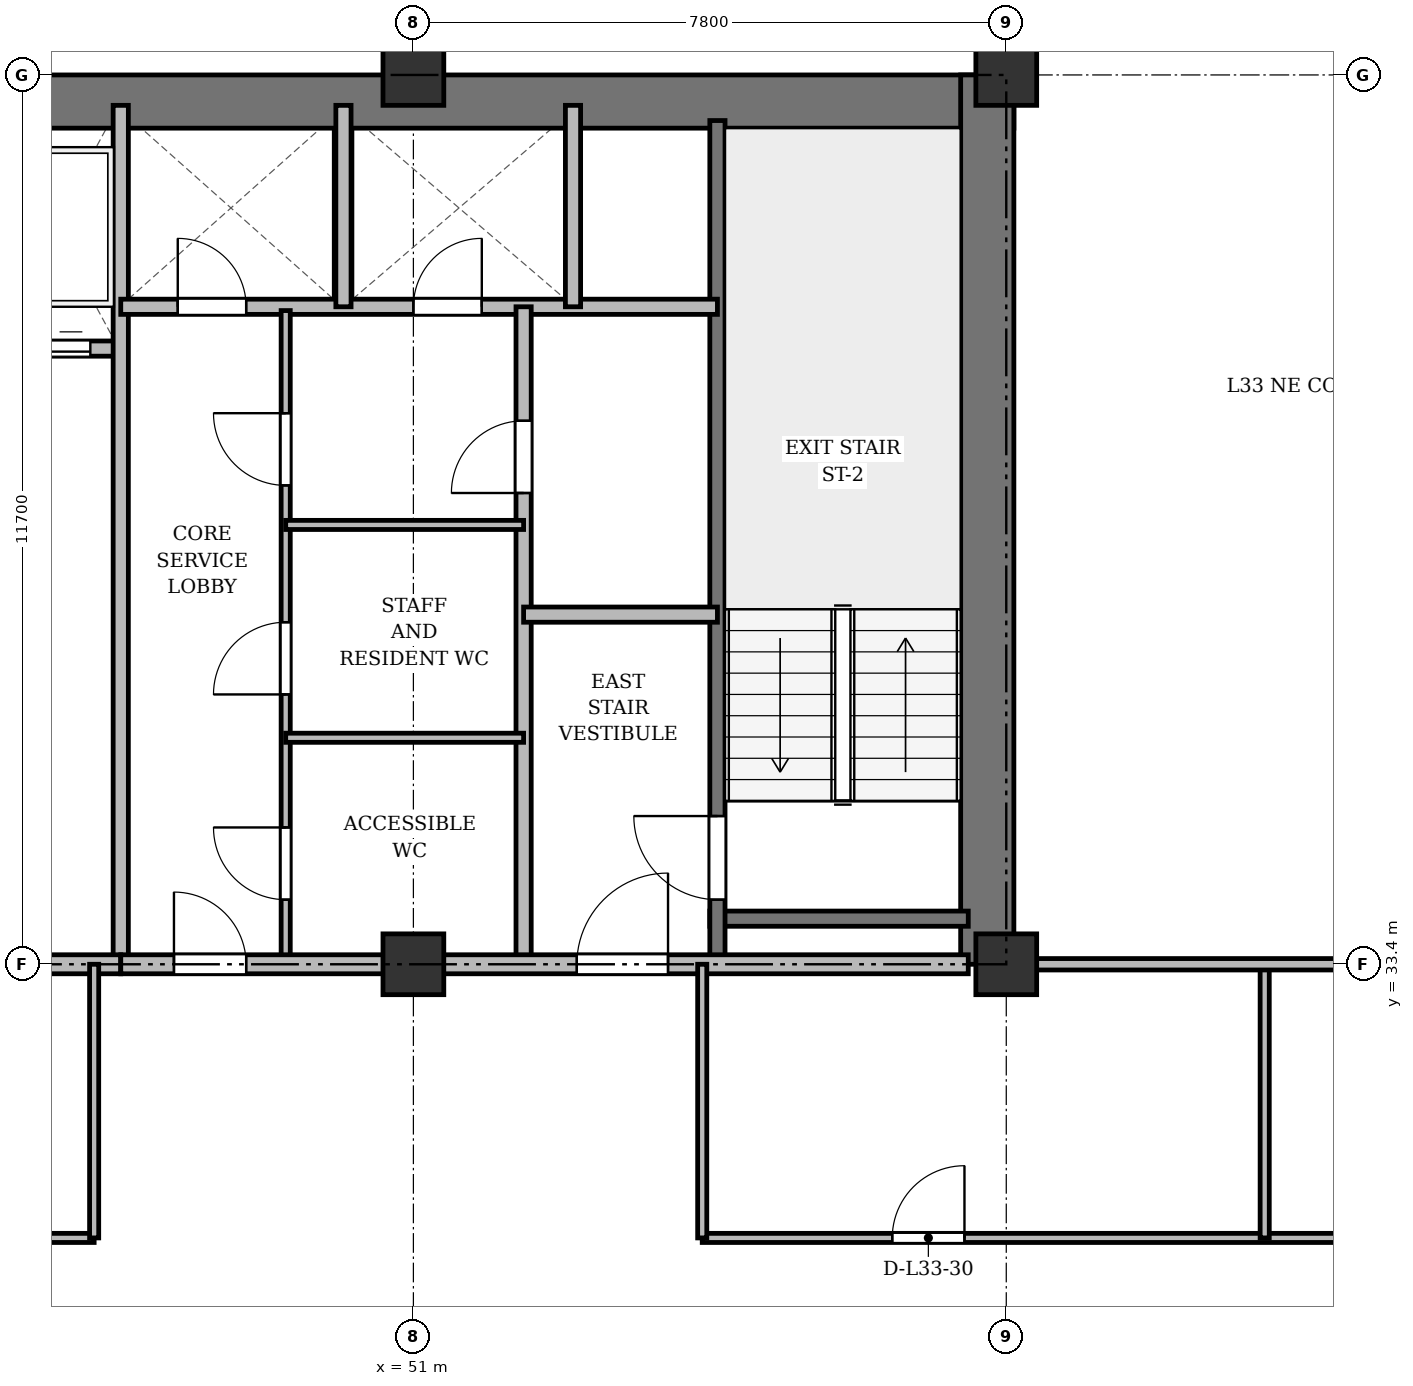
"""IFC4 building model, lengths in metres.
Left out: names, types, materials, properties, quantities, classifications, styles, units other than length and angle.
Written with IfcOpenShell. Run it as: python <this file> out.ifc"""

import sys

from ifc_helpers import new_model, si_unit, direction, frame, frame_2d, origin, origin_2d, place, context, subcontext, project, spatial, rectangle, extrude, source, transform, mapped, element, fill, save


model = new_model("IFC4")
c1 = context("Model", 3, precision=1e-05, world=origin(), true_north=direction((0.0, 1.0)))
c2 = subcontext(c1, "Body", "Model", "MODEL_VIEW")
j1 = project(units=[si_unit("LENGTHUNIT", "METRE"), si_unit("PLANEANGLEUNIT", "RADIAN")], contexts=[c1])
p1 = place(None, origin())
s1 = spatial("IfcSite", under=j1, at=p1, CompositionType="ELEMENT")
p2 = place(p1, origin())
s2 = spatial("IfcBuilding", under=s1, at=p2, CompositionType="ELEMENT")
p3 = place(p2, frame((0.0, 0.0, 128.5)))
s3 = spatial("IfcBuildingStorey", under=s2, at=p3, CompositionType="ELEMENT", Elevation=128.5)
m1 = source(origin(), c2, "Body", "SweptSolid", [
    extrude(rectangle(XDim=0.8, YDim=0.8, at=origin_2d()), origin(), (0.0, 0.0, 1.0), 3.6),
])
for number, where, z_axis, x_axis in (
    (1, (51.0, 33.4, 0.0), (0.0, 0.0, 1.0), (1.0, 0.0, 0.0)),
    (2, (51.0, 45.1, 0.0), (0.0, 0.0, 1.0), (1.0, 0.0, 0.0)),
    (3, (58.8, 33.4, 0.0), (0.0, 0.0, 1.0), (1.0, 0.0, 0.0)),
    (4, (58.8, 45.1, 0.0), (0.0, 0.0, 1.0), (1.0, 0.0, 0.0)),
):
    element("IfcColumn", number, at=place(p3, frame(where, z_axis=z_axis, x_axis=x_axis)), inside=s3, PredefinedType="COLUMN", context=c2, shape_type="MappedRepresentation", body=[
        mapped(m1, transform((0.0, 0.0, 0.0), x_axis=(1.0, 0.0, 0.0), y_axis=(0.0, 1.0, 0.0), z_axis=(0.0, 0.0, 1.0), scale=1.0)),
    ])
p4 = place(p3, frame((15.5, 44.75, 0.0), z_axis=(0.0, 0.0, 1.0), x_axis=(1.0, 0.0, 0.0)))
e5 = element("IfcWall", 5, at=p4, inside=s3, PredefinedType="SHEAR", context=c2, shape_type="SweptSolid", body=[
    extrude(rectangle(XDim=43.4, YDim=0.7, at=frame_2d((21.7, 0.0))), origin(), (0.0, 0.0, 1.0), 3.22),
])
p5 = place(p3, frame((58.55, 33.4, 0.0), z_axis=(0.0, 0.0, 1.0), x_axis=(0.0, 1.0, 0.0)))
e6 = element("IfcWall", 6, at=p5, inside=s3, PredefinedType="SHEAR", context=c2, shape_type="SweptSolid", body=[
    extrude(rectangle(XDim=11.7, YDim=0.7, at=frame_2d((5.85, 0.0))), origin(), (0.0, 0.0, 1.0), 3.22),
])
p6 = place(p3, frame((54.9, 34.0, 0.0), z_axis=(0.0, 0.0, 1.0), x_axis=(1.0, 0.0, 0.0)))
e7 = element("IfcWall", 7, at=p6, inside=s3, PredefinedType="SHEAR", context=c2, shape_type="SweptSolid", body=[
    extrude(rectangle(XDim=3.4, YDim=0.2, at=frame_2d((1.7, 0.0))), origin(), (0.0, 0.0, 1.0), 3.22),
])
p7 = place(p3, frame((55.0, 33.4, 0.0), z_axis=(0.0, 0.0, 1.0), x_axis=(0.0, 1.0, 0.0)))
e8 = element("IfcWall", 8, at=p7, inside=s3, PredefinedType="SHEAR", context=c2, shape_type="SweptSolid", body=[
    extrude(rectangle(XDim=11.1, YDim=0.2, at=frame_2d((5.55, 0.0))), origin(), (0.0, 0.0, 1.0), 3.22),
])
p8 = place(p7, frame((0.85, 0.0, 0.0)))
e9 = element("IfcOpeningElement", 9, at=p8, cuts=e8, PredefinedType="OPENING", context=c2, shape_type="SweptSolid", body=[
    extrude(rectangle(XDim=1.1, YDim=2.15, at=frame_2d((0.55, 1.075))), frame((0.0, 0.11, 0.0), z_axis=(0.0, -1.0, 0.0), x_axis=(1.0, 0.0, 0.0)), (0.0, 0.0, 1.0), 0.22),
])
p9 = place(p3, frame((40.25, 41.5, 0.0), z_axis=(0.0, 0.0, 1.0), x_axis=(1.0, 0.0, 0.0)))
e10 = element("IfcWall", 10, at=p9, inside=s3, PredefinedType="SOLIDWALL", context=c2, shape_type="SweptSolid", body=[
    extrude(rectangle(XDim=6.9, YDim=0.2, at=frame_2d((3.45, 0.0))), origin(), (0.0, 0.0, 1.0), 2.72),
])
p10 = place(p9, frame((0.35, 0.0, 0.0)))
e11 = element("IfcOpeningElement", 11, at=p10, cuts=e10, PredefinedType="OPENING", context=c2, shape_type="SweptSolid", body=[
    extrude(rectangle(XDim=1.05, YDim=2.15, at=frame_2d((0.525, 1.075))), frame((0.0, 0.11, 0.0), z_axis=(0.0, -1.0, 0.0), x_axis=(1.0, 0.0, 0.0)), (0.0, 0.0, 1.0), 0.22),
])
p11 = place(p9, frame((2.05, 0.0, 0.0)))
e12 = element("IfcOpeningElement", 12, at=p11, cuts=e10, PredefinedType="OPENING", context=c2, shape_type="SweptSolid", body=[
    extrude(rectangle(XDim=1.05, YDim=2.15, at=frame_2d((0.525, 1.075))), frame((0.0, 0.11, 0.0), z_axis=(0.0, -1.0, 0.0), x_axis=(1.0, 0.0, 0.0)), (0.0, 0.0, 1.0), 0.22),
])
p12 = place(p9, frame((3.75, 0.0, 0.0)))
e13 = element("IfcOpeningElement", 13, at=p12, cuts=e10, PredefinedType="OPENING", context=c2, shape_type="SweptSolid", body=[
    extrude(rectangle(XDim=1.05, YDim=2.15, at=frame_2d((0.525, 1.075))), frame((0.0, 0.11, 0.0), z_axis=(0.0, -1.0, 0.0), x_axis=(1.0, 0.0, 0.0)), (0.0, 0.0, 1.0), 0.22),
])
p13 = place(p9, frame((5.45, 0.0, 0.0)))
e14 = element("IfcOpeningElement", 14, at=p13, cuts=e10, PredefinedType="OPENING", context=c2, shape_type="SweptSolid", body=[
    extrude(rectangle(XDim=1.05, YDim=2.15, at=frame_2d((0.525, 1.075))), frame((0.0, 0.11, 0.0), z_axis=(0.0, -1.0, 0.0), x_axis=(1.0, 0.0, 0.0)), (0.0, 0.0, 1.0), 0.22),
])
p14 = place(p3, frame((47.15, 33.4, 0.0), z_axis=(0.0, 0.0, 1.0), x_axis=(0.0, 1.0, 0.0)))
e15 = element("IfcWall", 15, at=p14, inside=s3, PredefinedType="SOLIDWALL", context=c2, shape_type="SweptSolid", body=[
    extrude(rectangle(XDim=11.3, YDim=0.2, at=frame_2d((5.65, 0.0))), origin(), (0.0, 0.0, 1.0), 2.632),
])
p15 = place(p3, frame((26.3, 33.4, 0.0), z_axis=(0.0, 0.0, 1.0), x_axis=(1.0, 0.0, 0.0)))
e16 = element("IfcWall", 16, at=p15, inside=s3, PredefinedType="PARTITIONING", context=c2, shape_type="SweptSolid", body=[
    extrude(rectangle(XDim=20.85, YDim=0.25, at=frame_2d((10.425, 0.0))), origin(), (0.0, 0.0, 1.0), 2.632),
])
p16 = place(p15, frame((9.2, 0.0, 0.0)))
e17 = element("IfcOpeningElement", 17, at=p16, cuts=e16, PredefinedType="OPENING", context=c2, shape_type="SweptSolid", body=[
    extrude(rectangle(XDim=1.6, YDim=2.2, at=frame_2d((0.8, 1.1))), frame((0.0, 0.135, 0.0), z_axis=(0.0, -1.0, 0.0), x_axis=(1.0, 0.0, 0.0)), (0.0, 0.0, 1.0), 0.27),
])
p17 = place(p3, frame((47.15, 42.05, 0.0), z_axis=(0.0, 0.0, 1.0), x_axis=(1.0, 0.0, 0.0)))
e18 = element("IfcWall", 18, at=p17, inside=s3, PredefinedType="SOLIDWALL", context=c2, shape_type="SweptSolid", body=[
    extrude(rectangle(XDim=7.85, YDim=0.2, at=frame_2d((3.925, 0.0))), origin(), (0.0, 0.0, 1.0), 2.72),
])
p18 = place(p17, frame((0.75, 0.0, 0.0)))
e19 = element("IfcOpeningElement", 19, at=p18, cuts=e18, PredefinedType="OPENING", context=c2, shape_type="SweptSolid", body=[
    extrude(rectangle(XDim=0.9, YDim=2.1, at=frame_2d((0.45, 1.05))), frame((0.0, 0.11, 0.0), z_axis=(0.0, -1.0, 0.0), x_axis=(1.0, 0.0, 0.0)), (0.0, 0.0, 1.0), 0.22),
])
p19 = place(p17, frame((3.85, 0.0, 0.0)))
e20 = element("IfcOpeningElement", 20, at=p19, cuts=e18, PredefinedType="OPENING", context=c2, shape_type="SweptSolid", body=[
    extrude(rectangle(XDim=0.9, YDim=2.1, at=frame_2d((0.45, 1.05))), frame((0.0, 0.11, 0.0), z_axis=(0.0, -1.0, 0.0), x_axis=(1.0, 0.0, 0.0)), (0.0, 0.0, 1.0), 0.22),
])
for number, where, z_axis, x_axis in (
    (21, (50.08, 42.05, 0.0), (0.0, 0.0, 1.0), (0.0, 1.0, 0.0)),
    (22, (53.1, 42.05, 0.0), (0.0, 0.0, 1.0), (0.0, 1.0, 0.0)),
):
    element("IfcWall", number, at=place(p3, frame(where, z_axis=z_axis, x_axis=x_axis)), inside=s3, PredefinedType="SOLIDWALL", context=c2, shape_type="SweptSolid", body=[
        extrude(rectangle(XDim=2.65, YDim=0.2, at=frame_2d((1.325, 0.0))), origin(), (0.0, 0.0, 1.0), 3.22),
    ])
p20 = place(p3, frame((52.45, 33.4, 0.0), z_axis=(0.0, 0.0, 1.0), x_axis=(0.0, 1.0, 0.0)))
e23 = element("IfcWall", 23, at=p20, inside=s3, PredefinedType="PARTITIONING", context=c2, shape_type="SweptSolid", body=[
    extrude(rectangle(XDim=8.65, YDim=0.2, at=frame_2d((4.325, 0.0))), origin(), (0.0, 0.0, 1.0), 2.632),
])
p21 = place(p20, frame((6.2, 0.0, 0.0)))
e24 = element("IfcOpeningElement", 24, at=p21, cuts=e23, PredefinedType="OPENING", context=c2, shape_type="SweptSolid", body=[
    extrude(rectangle(XDim=0.95, YDim=2.15, at=frame_2d((0.475, 1.075))), frame((0.0, 0.11, 0.0), z_axis=(0.0, -1.0, 0.0), x_axis=(1.0, 0.0, 0.0)), (0.0, 0.0, 1.0), 0.22),
])
p22 = place(p3, frame((52.45, 38.0, 0.0), z_axis=(0.0, 0.0, 1.0), x_axis=(1.0, 0.0, 0.0)))
e25 = element("IfcWall", 25, at=p22, inside=s3, PredefinedType="PARTITIONING", context=c2, shape_type="SweptSolid", body=[
    extrude(rectangle(XDim=2.55, YDim=0.2, at=frame_2d((1.275, 0.0))), origin(), (0.0, 0.0, 1.0), 3.22),
])
p23 = place(p3, frame((49.32, 33.4, 0.0), z_axis=(0.0, 0.0, 1.0), x_axis=(0.0, 1.0, 0.0)))
e26 = element("IfcWall", 26, at=p23, inside=s3, PredefinedType="PARTITIONING", context=c2, shape_type="SweptSolid", body=[
    extrude(rectangle(XDim=8.6, YDim=0.12, at=frame_2d((4.3, 0.0))), origin(), (0.0, 0.0, 1.0), 2.632),
])
p24 = place(p23, frame((0.85, 0.0, 0.0)))
e27 = element("IfcOpeningElement", 27, at=p24, cuts=e26, PredefinedType="OPENING", context=c2, shape_type="SweptSolid", body=[
    extrude(rectangle(XDim=0.95, YDim=2.15, at=frame_2d((0.475, 1.075))), frame((0.0, 0.07, 0.0), z_axis=(0.0, -1.0, 0.0), x_axis=(1.0, 0.0, 0.0)), (0.0, 0.0, 1.0), 0.14),
])
p25 = place(p23, frame((3.55, 0.0, 0.0)))
e28 = element("IfcOpeningElement", 28, at=p25, cuts=e26, PredefinedType="OPENING", context=c2, shape_type="SweptSolid", body=[
    extrude(rectangle(XDim=0.95, YDim=2.15, at=frame_2d((0.475, 1.075))), frame((0.0, 0.07, 0.0), z_axis=(0.0, -1.0, 0.0), x_axis=(1.0, 0.0, 0.0)), (0.0, 0.0, 1.0), 0.14),
])
p26 = place(p23, frame((6.3, 0.0, 0.0)))
e29 = element("IfcOpeningElement", 29, at=p26, cuts=e26, PredefinedType="OPENING", context=c2, shape_type="SweptSolid", body=[
    extrude(rectangle(XDim=0.95, YDim=2.15, at=frame_2d((0.475, 1.075))), frame((0.0, 0.07, 0.0), z_axis=(0.0, -1.0, 0.0), x_axis=(1.0, 0.0, 0.0)), (0.0, 0.0, 1.0), 0.14),
])
for number, where, z_axis, x_axis in (
    (30, (49.32, 36.38, 0.0), (0.0, 0.0, 1.0), (1.0, 0.0, 0.0)),
    (31, (49.32, 39.18, 0.0), (0.0, 0.0, 1.0), (1.0, 0.0, 0.0)),
):
    element("IfcWall", number, at=place(p3, frame(where, z_axis=z_axis, x_axis=x_axis)), inside=s3, PredefinedType="PARTITIONING", context=c2, shape_type="SweptSolid", body=[
        extrude(rectangle(XDim=3.13, YDim=0.12, at=frame_2d((1.565, 0.0))), origin(), (0.0, 0.0, 1.0), 2.72),
    ])
p27 = place(p3, frame((47.15, 33.4, 0.0), z_axis=(0.0, 0.0, 1.0), x_axis=(1.0, 0.0, 0.0)))
e32 = element("IfcWall", 32, at=p27, inside=s3, PredefinedType="PARTITIONING", context=c2, shape_type="SweptSolid", body=[
    extrude(rectangle(XDim=11.15, YDim=0.25, at=frame_2d((5.575, 0.0))), origin(), (0.0, 0.0, 1.0), 2.632),
])
p28 = place(p27, frame((0.7, 0.0, 0.0)))
e33 = element("IfcOpeningElement", 33, at=p28, cuts=e32, PredefinedType="OPENING", context=c2, shape_type="SweptSolid", body=[
    extrude(rectangle(XDim=0.95, YDim=2.15, at=frame_2d((0.475, 1.075))), frame((0.0, 0.135, 0.0), z_axis=(0.0, -1.0, 0.0), x_axis=(1.0, 0.0, 0.0)), (0.0, 0.0, 1.0), 0.27),
])
p29 = place(p27, frame((6.0, 0.0, 0.0)))
e34 = element("IfcOpeningElement", 34, at=p29, cuts=e32, PredefinedType="OPENING", context=c2, shape_type="SweptSolid", body=[
    extrude(rectangle(XDim=1.2, YDim=2.15, at=frame_2d((0.6, 1.075))), frame((0.0, 0.135, 0.0), z_axis=(0.0, -1.0, 0.0), x_axis=(1.0, 0.0, 0.0)), (0.0, 0.0, 1.0), 0.27),
])
p30 = place(p3, frame((38.2, 29.8, 0.0), z_axis=(0.0, 0.0, 1.0), x_axis=(1.0, 0.0, 0.0)))
e35 = element("IfcWall", 35, at=p30, inside=s3, PredefinedType="PARTITIONING", context=c2, shape_type="SweptSolid", body=[
    extrude(rectangle(XDim=8.6, YDim=0.12, at=frame_2d((4.3, 0.0))), origin(), (0.0, 0.0, 1.0), 2.72),
])
p31 = place(p30, frame((3.462, 0.0, 0.0)))
e36 = element("IfcOpeningElement", 36, at=p31, cuts=e35, PredefinedType="OPENING", context=c2, shape_type="SweptSolid", body=[
    extrude(rectangle(XDim=0.95, YDim=2.15, at=frame_2d((0.475, 1.075))), frame((0.0, 0.07, 0.0), z_axis=(0.0, -1.0, 0.0), x_axis=(1.0, 0.0, 0.0)), (0.0, 0.0, 1.0), 0.14),
])
p32 = place(p3, frame((54.8, 29.8, 0.0), z_axis=(0.0, 0.0, 1.0), x_axis=(1.0, 0.0, 0.0)))
e37 = element("IfcWall", 37, at=p32, inside=s3, PredefinedType="PARTITIONING", context=c2, shape_type="SweptSolid", body=[
    extrude(rectangle(XDim=14.85, YDim=0.12, at=frame_2d((7.425, 0.0))), origin(), (0.0, 0.0, 1.0), 2.72),
])
p33 = place(p32, frame((2.5, 0.0, 0.0)))
e38 = element("IfcOpeningElement", 38, at=p33, cuts=e37, PredefinedType="OPENING", context=c2, shape_type="SweptSolid", body=[
    extrude(rectangle(XDim=0.95, YDim=2.15, at=frame_2d((0.475, 1.075))), frame((0.0, 0.07, 0.0), z_axis=(0.0, -1.0, 0.0), x_axis=(1.0, 0.0, 0.0)), (0.0, 0.0, 1.0), 0.14),
])
p34 = place(p32, frame((9.2, 0.0, 0.0)))
e39 = element("IfcOpeningElement", 39, at=p34, cuts=e37, PredefinedType="OPENING", context=c2, shape_type="SweptSolid", body=[
    extrude(rectangle(XDim=0.95, YDim=2.15, at=frame_2d((0.475, 1.075))), frame((0.0, 0.07, 0.0), z_axis=(0.0, -1.0, 0.0), x_axis=(1.0, 0.0, 0.0)), (0.0, 0.0, 1.0), 0.14),
])
for number, where, z_axis, x_axis in (
    (40, (62.2, 29.8, 0.0), (0.0, 0.0, 1.0), (0.0, 1.0, 0.0)),
    (41, (46.8, 29.8, 0.0), (0.0, 0.0, 1.0), (0.0, 1.0, 0.0)),
    (42, (54.8, 29.8, 0.0), (0.0, 0.0, 1.0), (0.0, 1.0, 0.0)),
):
    element("IfcWall", number, at=place(p3, frame(where, z_axis=z_axis, x_axis=x_axis)), inside=s3, PredefinedType="PARTITIONING", context=c2, shape_type="SweptSolid", body=[
        extrude(rectangle(XDim=3.6, YDim=0.12, at=frame_2d((1.8, 0.0))), origin(), (0.0, 0.0, 1.0), 2.632),
    ])
p35 = place(p3, frame((58.8, 33.4, 0.0), z_axis=(0.0, 0.0, 1.0), x_axis=(1.0, 0.0, 0.0)))
e43 = element("IfcWall", 43, at=p35, inside=s3, PredefinedType="PARTITIONING", context=c2, shape_type="SweptSolid", body=[
    extrude(rectangle(XDim=10.85, YDim=0.15, at=frame_2d((5.425, 0.0))), origin(), (0.0, 0.0, 1.0), 2.632),
])
p36 = place(p35, frame((4.76, 0.0, 0.0)))
e44 = element("IfcOpeningElement", 44, at=p36, cuts=e43, PredefinedType="OPENING", context=c2, shape_type="SweptSolid", body=[
    extrude(rectangle(XDim=0.95, YDim=2.15, at=frame_2d((0.475, 1.075))), frame((0.0, 0.085, 0.0), z_axis=(0.0, -1.0, 0.0), x_axis=(1.0, 0.0, 0.0)), (0.0, 0.0, 1.0), 0.17),
])
p37 = place(p3, frame((58.8, 44.75, 0.0), z_axis=(0.0, 0.0, 1.0), x_axis=(0.0, 1.0, 0.0)))
e45 = element("IfcWall", 45, at=p37, inside=s3, PredefinedType="PARTITIONING", context=c2, shape_type="SweptSolid", body=[
    extrude(rectangle(XDim=3.61, YDim=0.15, at=frame_2d((1.805, 0.0))), origin(), (0.0, 0.0, 1.0), 2.72),
])
p38 = place(p37, frame((1.1, 0.0, 0.0)))
e46 = element("IfcOpeningElement", 46, at=p38, cuts=e45, PredefinedType="OPENING", context=c2, shape_type="SweptSolid", body=[
    extrude(rectangle(XDim=0.95, YDim=2.15, at=frame_2d((0.475, 1.075))), frame((0.0, 0.085, 0.0), z_axis=(0.0, -1.0, 0.0), x_axis=(1.0, 0.0, 0.0)), (0.0, 0.0, 1.0), 0.17),
])
m2 = source(origin(), c2, "Body", "SweptSolid", [
    extrude(rectangle(XDim=1.1, YDim=2.15, at=frame_2d((0.55, 1.075))), frame((0.0, 0.025, 0.0), z_axis=(0.0, -1.0, 0.0), x_axis=(1.0, 0.0, 0.0)), (0.0, 0.0, 1.0), 0.05),
])
p39 = place(p8, origin())
e47 = element("IfcDoor", 47, at=p39, inside=s3, OperationType="SINGLE_SWING_RIGHT", PredefinedType="DOOR", context=c2, shape_type="MappedRepresentation", body=[
    mapped(m2, transform((0.0, 0.0, 0.0), x_axis=(1.0, 0.0, 0.0), y_axis=(0.0, 1.0, 0.0), z_axis=(0.0, 0.0, 1.0), scale=1.0)),
])
fill(e9, e47)
m3 = source(origin(), c2, "Body", "SweptSolid", [
    extrude(rectangle(XDim=1.05, YDim=2.15, at=frame_2d((0.525, 1.075))), frame((0.0, 0.025, 0.0), z_axis=(0.0, -1.0, 0.0), x_axis=(1.0, 0.0, 0.0)), (0.0, 0.0, 1.0), 0.05),
])
p40 = place(p13, origin())
e48 = element("IfcDoor", 48, at=p40, inside=s3, OperationType="DOUBLE_DOOR_SLIDING", PredefinedType="DOOR", context=c2, shape_type="MappedRepresentation", body=[
    mapped(m3, transform((0.0, 0.0, 0.0), x_axis=(1.0, 0.0, 0.0), y_axis=(0.0, 1.0, 0.0), z_axis=(0.0, 0.0, 1.0), scale=1.0)),
])
fill(e14, e48)
m4 = source(origin(), c2, "Body", "SweptSolid", [
    extrude(rectangle(XDim=0.9, YDim=2.1, at=frame_2d((0.45, 1.05))), frame((0.0, 0.025, 0.0), z_axis=(0.0, -1.0, 0.0), x_axis=(1.0, 0.0, 0.0)), (0.0, 0.0, 1.0), 0.05),
])
p41 = place(p18, origin())
e49 = element("IfcDoor", 49, at=p41, inside=s3, OperationType="SINGLE_SWING_LEFT", PredefinedType="DOOR", context=c2, shape_type="MappedRepresentation", body=[
    mapped(m4, transform((0.0, 0.0, 0.0), x_axis=(1.0, 0.0, 0.0), y_axis=(0.0, 1.0, 0.0), z_axis=(0.0, 0.0, 1.0), scale=1.0)),
])
fill(e19, e49)
p42 = place(p19, origin())
e50 = element("IfcDoor", 50, at=p42, inside=s3, OperationType="SINGLE_SWING_RIGHT", PredefinedType="DOOR", context=c2, shape_type="MappedRepresentation", body=[
    mapped(m4, transform((0.0, 0.0, 0.0), x_axis=(1.0, 0.0, 0.0), y_axis=(0.0, 1.0, 0.0), z_axis=(0.0, 0.0, 1.0), scale=1.0)),
])
fill(e20, e50)
m5 = source(origin(), c2, "Body", "SweptSolid", [
    extrude(rectangle(XDim=0.95, YDim=2.15, at=frame_2d((0.475, 1.075))), frame((0.0, 0.025, 0.0), z_axis=(0.0, -1.0, 0.0), x_axis=(1.0, 0.0, 0.0)), (0.0, 0.0, 1.0), 0.05),
])
p43 = place(p21, origin())
e51 = element("IfcDoor", 51, at=p43, inside=s3, OperationType="SINGLE_SWING_LEFT", PredefinedType="DOOR", context=c2, shape_type="MappedRepresentation", body=[
    mapped(m5, transform((0.0, 0.0, 0.0), x_axis=(1.0, 0.0, 0.0), y_axis=(0.0, 1.0, 0.0), z_axis=(0.0, 0.0, 1.0), scale=1.0)),
])
fill(e24, e51)
p44 = place(p24, origin())
e52 = element("IfcDoor", 52, at=p44, inside=s3, OperationType="SINGLE_SWING_RIGHT", PredefinedType="DOOR", context=c2, shape_type="MappedRepresentation", body=[
    mapped(m5, transform((0.0, 0.0, 0.0), x_axis=(1.0, 0.0, 0.0), y_axis=(0.0, 1.0, 0.0), z_axis=(0.0, 0.0, 1.0), scale=1.0)),
])
fill(e27, e52)
p45 = place(p25, origin())
e53 = element("IfcDoor", 53, at=p45, inside=s3, OperationType="SINGLE_SWING_LEFT", PredefinedType="DOOR", context=c2, shape_type="MappedRepresentation", body=[
    mapped(m5, transform((0.0, 0.0, 0.0), x_axis=(1.0, 0.0, 0.0), y_axis=(0.0, 1.0, 0.0), z_axis=(0.0, 0.0, 1.0), scale=1.0)),
])
fill(e28, e53)
p46 = place(p26, origin())
e54 = element("IfcDoor", 54, at=p46, inside=s3, OperationType="SINGLE_SWING_RIGHT", PredefinedType="DOOR", context=c2, shape_type="MappedRepresentation", body=[
    mapped(m5, transform((0.0, 0.0, 0.0), x_axis=(1.0, 0.0, 0.0), y_axis=(0.0, 1.0, 0.0), z_axis=(0.0, 0.0, 1.0), scale=1.0)),
])
fill(e29, e54)
p47 = place(p28, origin())
e55 = element("IfcDoor", 55, at=p47, inside=s3, OperationType="SINGLE_SWING_LEFT", PredefinedType="DOOR", context=c2, shape_type="MappedRepresentation", body=[
    mapped(m5, transform((0.0, 0.0, 0.0), x_axis=(1.0, 0.0, 0.0), y_axis=(0.0, 1.0, 0.0), z_axis=(0.0, 0.0, 1.0), scale=1.0)),
])
fill(e33, e55)
m6 = source(origin(), c2, "Body", "SweptSolid", [
    extrude(rectangle(XDim=1.2, YDim=2.15, at=frame_2d((0.6, 1.075))), frame((0.0, 0.025, 0.0), z_axis=(0.0, -1.0, 0.0), x_axis=(1.0, 0.0, 0.0)), (0.0, 0.0, 1.0), 0.05),
])
p48 = place(p29, origin())
e56 = element("IfcDoor", 56, at=p48, inside=s3, OperationType="SINGLE_SWING_RIGHT", PredefinedType="DOOR", context=c2, shape_type="MappedRepresentation", body=[
    mapped(m6, transform((0.0, 0.0, 0.0), x_axis=(1.0, 0.0, 0.0), y_axis=(0.0, 1.0, 0.0), z_axis=(0.0, 0.0, 1.0), scale=1.0)),
])
fill(e34, e56)
p49 = place(p33, origin())
e57 = element("IfcDoor", 57, at=p49, inside=s3, OperationType="SINGLE_SWING_RIGHT", PredefinedType="DOOR", context=c2, shape_type="MappedRepresentation", body=[
    mapped(m5, transform((0.0, 0.0, 0.0), x_axis=(1.0, 0.0, 0.0), y_axis=(0.0, 1.0, 0.0), z_axis=(0.0, 0.0, 1.0), scale=1.0)),
])
fill(e38, e57)
save(model, sys.argv[1])
